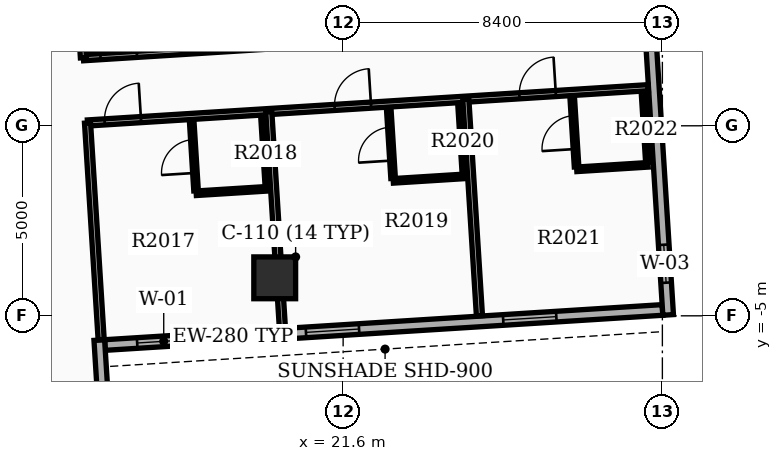
"""IFC4 building model, lengths in metres.
Left out: names, types, materials, properties, quantities, classifications, styles, units other than length and angle.
Written with IfcOpenShell. Run it as: python <this file> out.ifc"""

import sys

from ifc_helpers import new_model, si_unit, direction, frame, frame_2d, origin, origin_2d, place, context, subcontext, project, spatial, rectangle, extrude, element, fill, save


model = new_model("IFC4")
c1 = context("Model", 3, precision=1e-05, world=origin(), true_north=direction((0.0, 1.0)))
c2 = subcontext(c1, "Body", "Model", "MODEL_VIEW")
j1 = project(units=[si_unit("LENGTHUNIT", "METRE"), si_unit("PLANEANGLEUNIT", "RADIAN")], contexts=[c1])
p1 = place(None, origin())
s1 = spatial("IfcSite", under=j1, at=p1, CompositionType="ELEMENT")
p2 = place(p1, origin())
s2 = spatial("IfcBuilding", under=s1, at=p2, CompositionType="ELEMENT")
p3 = place(p2, frame((0.0, 0.0, 128.1)))
s3 = spatial("IfcBuildingStorey", under=s2, at=p3, CompositionType="ELEMENT", Elevation=128.1)
p4 = place(p3, frame((19.8, -4.0, 0.0), z_axis=(0.0, 0.0, 1.0), x_axis=(1.0, 0.0, 0.0)))
e1 = element("IfcColumn", 1, at=p4, inside=s3, PredefinedType="COLUMN", context=c2, shape_type="SweptSolid", body=[
    extrude(rectangle(XDim=1.1, YDim=1.1, at=origin_2d()), origin(), (0.0, 0.0, 1.0), 3.9),
])
p5 = place(p3, frame((15.333, -5.769, 0.0), z_axis=(0.0, 0.0, 1.0), x_axis=(0.998027423805, 0.062779465852, 0.0)))
e2 = element("IfcWall", 2, at=p5, inside=s3, PredefinedType="STANDARD", context=c2, shape_type="SweptSolid", body=[
    extrude(rectangle(XDim=14.7, YDim=0.28, at=frame_2d((7.35, 0.0))), origin(), (0.0, 0.0, 1.0), 2.97),
])
p6 = place(p5, frame((0.85, 0.0, 0.8)))
e3 = element("IfcOpeningElement", 3, at=p6, cuts=e2, PredefinedType="OPENING", context=c2, shape_type="SweptSolid", body=[
    extrude(rectangle(XDim=1.4, YDim=1.6, at=frame_2d((0.7, 0.8))), frame((0.0, 0.15, 0.0), z_axis=(0.0, -1.0, 0.0), x_axis=(1.0, 0.0, 0.0)), (0.0, 0.0, 1.0), 0.3),
])
p7 = place(p5, frame((5.3, 0.0, 0.8)))
e4 = element("IfcOpeningElement", 4, at=p7, cuts=e2, PredefinedType="OPENING", context=c2, shape_type="SweptSolid", body=[
    extrude(rectangle(XDim=1.4, YDim=1.6, at=frame_2d((0.7, 0.8))), frame((0.0, 0.15, 0.0), z_axis=(0.0, -1.0, 0.0), x_axis=(1.0, 0.0, 0.0)), (0.0, 0.0, 1.0), 0.3),
])
p8 = place(p5, frame((10.5, 0.0, 0.8)))
e5 = element("IfcOpeningElement", 5, at=p8, cuts=e2, PredefinedType="OPENING", context=c2, shape_type="SweptSolid", body=[
    extrude(rectangle(XDim=1.4, YDim=1.6, at=frame_2d((0.7, 0.8))), frame((0.0, 0.15, 0.0), z_axis=(0.0, -1.0, 0.0), x_axis=(1.0, 0.0, 0.0)), (0.0, 0.0, 1.0), 0.3),
])
p9 = place(p3, frame((30.152, -4.977, 0.0), z_axis=(0.0, 0.0, 1.0), x_axis=(-0.062797041623, 0.998026318072, 0.0)))
e6 = element("IfcWall", 6, at=p9, inside=s3, PredefinedType="STANDARD", context=c2, shape_type="SweptSolid", body=[
    extrude(rectangle(XDim=13.72, YDim=0.28, at=frame_2d((6.86, 0.0))), origin(), (0.0, 0.0, 1.0), 2.97),
])
p10 = place(p9, frame((0.85, 0.0, 0.85)))
e7 = element("IfcOpeningElement", 7, at=p10, cuts=e6, PredefinedType="OPENING", context=c2, shape_type="SweptSolid", body=[
    extrude(rectangle(XDim=1.0, YDim=1.5, at=frame_2d((0.5, 0.75))), frame((0.0, 0.15, 0.0), z_axis=(0.0, -1.0, 0.0), x_axis=(1.0, 0.0, 0.0)), (0.0, 0.0, 1.0), 0.3),
])
p11 = place(p3, frame((15.184, -5.638, 0.0), z_axis=(0.0, 0.0, 1.0), x_axis=(0.062779317195, -0.998027433156, 0.0)))
e8 = element("IfcWall", 8, at=p11, inside=s3, PredefinedType="STANDARD", context=c2, shape_type="SweptSolid", body=[
    extrude(rectangle(XDim=6.86, YDim=0.28, at=frame_2d((3.43, 0.0))), origin(), (0.0, 0.0, 1.0), 2.97),
])
p12 = place(p3, frame((14.767, 1.791, 0.0), z_axis=(0.0, 0.0, 1.0), x_axis=(0.998026529199, 0.062793686106, 0.0)))
e9 = element("IfcWall", 9, at=p12, inside=s3, PredefinedType="PARTITIONING", context=c2, shape_type="SweptSolid", body=[
    extrude(rectangle(XDim=14.782, YDim=0.16, at=frame_2d((7.391, 0.0))), origin(), (0.0, 0.0, 1.0), 2.96),
])
p13 = place(p12, frame((0.45, 0.0, 0.0)))
e10 = element("IfcOpeningElement", 10, at=p13, cuts=e9, PredefinedType="OPENING", context=c2, shape_type="SweptSolid", body=[
    extrude(rectangle(XDim=0.96, YDim=2.15, at=frame_2d((0.48, 1.075))), frame((0.0, 0.09, 0.0), z_axis=(0.0, -1.0, 0.0), x_axis=(1.0, 0.0, 0.0)), (0.0, 0.0, 1.0), 0.18),
])
p14 = place(p12, frame((6.514, 0.0, 0.0)))
e11 = element("IfcOpeningElement", 11, at=p14, cuts=e9, PredefinedType="OPENING", context=c2, shape_type="SweptSolid", body=[
    extrude(rectangle(XDim=0.96, YDim=2.15, at=frame_2d((0.48, 1.075))), frame((0.0, 0.09, 0.0), z_axis=(0.0, -1.0, 0.0), x_axis=(1.0, 0.0, 0.0)), (0.0, 0.0, 1.0), 0.18),
])
p15 = place(p12, frame((11.386, 0.0, 0.0)))
e12 = element("IfcOpeningElement", 12, at=p15, cuts=e9, PredefinedType="OPENING", context=c2, shape_type="SweptSolid", body=[
    extrude(rectangle(XDim=0.96, YDim=2.15, at=frame_2d((0.48, 1.075))), frame((0.0, 0.09, 0.0), z_axis=(0.0, -1.0, 0.0), x_axis=(1.0, 0.0, 0.0)), (0.0, 0.0, 1.0), 0.18),
])
p16 = place(p3, frame((14.767, 1.791, 0.0), z_axis=(0.0, 0.0, 1.0), x_axis=(-0.062788072387, 0.998026882386, 0.0)))
e13 = element("IfcWall", 13, at=p16, inside=s3, PredefinedType="PARTITIONING", context=c2, shape_type="SweptSolid", body=[
    extrude(rectangle(XDim=5.712, YDim=0.16, at=frame_2d((2.856, 0.0))), origin(), (0.0, 0.0, 1.0), 2.96),
])
p17 = place(p3, frame((14.875, 0.074, 0.0), z_axis=(0.0, 0.0, 1.0), x_axis=(0.998027499025, 0.062778270041, 0.0)))
e14 = element("IfcWall", 14, at=p17, inside=s3, PredefinedType="PARTITIONING", context=c2, shape_type="SweptSolid", body=[
    extrude(rectangle(XDim=14.782, YDim=0.16, at=frame_2d((7.391, 0.0))), origin(), (0.0, 0.0, 1.0), 2.96),
])
p18 = place(p17, frame((0.45, 0.0, 0.0)))
e15 = element("IfcOpeningElement", 15, at=p18, cuts=e14, PredefinedType="OPENING", context=c2, shape_type="SweptSolid", body=[
    extrude(rectangle(XDim=0.96, YDim=2.15, at=frame_2d((0.48, 1.075))), frame((0.0, 0.09, 0.0), z_axis=(0.0, -1.0, 0.0), x_axis=(1.0, 0.0, 0.0)), (0.0, 0.0, 1.0), 0.18),
])
p19 = place(p17, frame((6.514, 0.0, 0.0)))
e16 = element("IfcOpeningElement", 16, at=p19, cuts=e14, PredefinedType="OPENING", context=c2, shape_type="SweptSolid", body=[
    extrude(rectangle(XDim=0.96, YDim=2.15, at=frame_2d((0.48, 1.075))), frame((0.0, 0.09, 0.0), z_axis=(0.0, -1.0, 0.0), x_axis=(1.0, 0.0, 0.0)), (0.0, 0.0, 1.0), 0.18),
])
p20 = place(p17, frame((11.386, 0.0, 0.0)))
e17 = element("IfcOpeningElement", 17, at=p20, cuts=e14, PredefinedType="OPENING", context=c2, shape_type="SweptSolid", body=[
    extrude(rectangle(XDim=0.96, YDim=2.15, at=frame_2d((0.48, 1.075))), frame((0.0, 0.09, 0.0), z_axis=(0.0, -1.0, 0.0), x_axis=(1.0, 0.0, 0.0)), (0.0, 0.0, 1.0), 0.18),
])
p21 = place(p3, frame((14.875, 0.074, 0.0), z_axis=(0.0, 0.0, 1.0), x_axis=(0.062785394105, -0.998027050879, 0.0)))
e18 = element("IfcWall", 18, at=p21, inside=s3, PredefinedType="PARTITIONING", context=c2, shape_type="SweptSolid", body=[
    extrude(rectangle(XDim=5.712, YDim=0.16, at=frame_2d((2.856, 0.0))), origin(), (0.0, 0.0, 1.0), 2.96),
])
p22 = place(p3, frame((19.643, 0.374, 0.0), z_axis=(0.0, 0.0, 1.0), x_axis=(0.062790750896, -0.998026713872, 0.0)))
e19 = element("IfcWall", 19, at=p22, inside=s3, PredefinedType="PARTITIONING", context=c2, shape_type="SweptSolid", body=[
    extrude(rectangle(XDim=5.712, YDim=0.16, at=frame_2d((2.856, 0.0))), origin(), (0.0, 0.0, 1.0), 2.96),
])
p23 = place(p3, frame((17.73, -1.71, 0.0), z_axis=(0.0, 0.0, 1.0), x_axis=(-0.062779145668, 0.998027443946, 0.0)))
e20 = element("IfcWall", 20, at=p23, inside=s3, PredefinedType="PARTITIONING", context=c2, shape_type="SweptSolid", body=[
    extrude(rectangle(XDim=1.82, YDim=0.12, at=frame_2d((0.91, 0.0))), origin(), (0.0, 0.0, 1.0), 2.96),
])
p24 = place(p23, frame((0.47, 0.0, 0.0)))
e21 = element("IfcOpeningElement", 21, at=p24, cuts=e20, PredefinedType="OPENING", context=c2, shape_type="SweptSolid", body=[
    extrude(rectangle(XDim=0.88, YDim=2.1, at=frame_2d((0.44, 1.05))), frame((0.0, 0.07, 0.0), z_axis=(0.0, -1.0, 0.0), x_axis=(1.0, 0.0, 0.0)), (0.0, 0.0, 1.0), 0.14),
])
p25 = place(p3, frame((19.607, -1.592, 0.0), z_axis=(0.0, 0.0, 1.0), x_axis=(-0.062779145668, 0.998027443946, 0.0)))
e22 = element("IfcWall", 22, at=p25, inside=s3, PredefinedType="PARTITIONING", context=c2, shape_type="SweptSolid", body=[
    extrude(rectangle(XDim=1.82, YDim=0.12, at=frame_2d((0.91, 0.0))), origin(), (0.0, 0.0, 1.0), 2.96),
])
p26 = place(p3, frame((17.734, -1.775, 0.0), z_axis=(0.0, 0.0, 1.0), x_axis=(0.998030789148, 0.062725942896, 0.0)))
e23 = element("IfcWall", 23, at=p26, inside=s3, PredefinedType="PARTITIONING", context=c2, shape_type="SweptSolid", body=[
    extrude(rectangle(XDim=1.88, YDim=0.12, at=frame_2d((0.94, 0.0))), origin(), (0.0, 0.0, 1.0), 2.96),
])
p27 = place(p3, frame((24.828, 0.7, 0.0), z_axis=(0.0, 0.0, 1.0), x_axis=(0.062833326074, -0.998024034347, 0.0)))
e24 = element("IfcWall", 24, at=p27, inside=s3, PredefinedType="PARTITIONING", context=c2, shape_type="SweptSolid", body=[
    extrude(rectangle(XDim=5.712, YDim=0.16, at=frame_2d((2.856, 0.0))), origin(), (0.0, 0.0, 1.0), 2.96),
])
p28 = place(p3, frame((22.915, -1.384, 0.0), z_axis=(0.0, 0.0, 1.0), x_axis=(-0.062779145668, 0.998027443946, 0.0)))
e25 = element("IfcWall", 25, at=p28, inside=s3, PredefinedType="PARTITIONING", context=c2, shape_type="SweptSolid", body=[
    extrude(rectangle(XDim=1.82, YDim=0.12, at=frame_2d((0.91, 0.0))), origin(), (0.0, 0.0, 1.0), 2.96),
])
p29 = place(p28, frame((0.47, 0.0, 0.0)))
e26 = element("IfcOpeningElement", 26, at=p29, cuts=e25, PredefinedType="OPENING", context=c2, shape_type="SweptSolid", body=[
    extrude(rectangle(XDim=0.88, YDim=2.1, at=frame_2d((0.44, 1.05))), frame((0.0, 0.07, 0.0), z_axis=(0.0, -1.0, 0.0), x_axis=(1.0, 0.0, 0.0)), (0.0, 0.0, 1.0), 0.14),
])
p30 = place(p3, frame((24.792, -1.266, 0.0), z_axis=(0.0, 0.0, 1.0), x_axis=(-0.062912758763, 0.998019030272, 0.0)))
e27 = element("IfcWall", 27, at=p30, inside=s3, PredefinedType="PARTITIONING", context=c2, shape_type="SweptSolid", body=[
    extrude(rectangle(XDim=1.82, YDim=0.12, at=frame_2d((0.91, 0.0))), origin(), (0.0, 0.0, 1.0), 2.96),
])
p31 = place(p3, frame((22.919, -1.449, 0.0), z_axis=(0.0, 0.0, 1.0), x_axis=(0.998030789148, 0.062725942896, 0.0)))
e28 = element("IfcWall", 28, at=p31, inside=s3, PredefinedType="PARTITIONING", context=c2, shape_type="SweptSolid", body=[
    extrude(rectangle(XDim=1.88, YDim=0.12, at=frame_2d((0.94, 0.0))), origin(), (0.0, 0.0, 1.0), 2.96),
])
p32 = place(p3, frame((27.743, -1.08, 0.0), z_axis=(0.0, 0.0, 1.0), x_axis=(-0.062787551592, 0.998026915151, 0.0)))
e29 = element("IfcWall", 29, at=p32, inside=s3, PredefinedType="PARTITIONING", context=c2, shape_type="SweptSolid", body=[
    extrude(rectangle(XDim=1.82, YDim=0.12, at=frame_2d((0.91, 0.0))), origin(), (0.0, 0.0, 1.0), 2.96),
])
p33 = place(p32, frame((0.47, 0.0, 0.0)))
e30 = element("IfcOpeningElement", 30, at=p33, cuts=e29, PredefinedType="OPENING", context=c2, shape_type="SweptSolid", body=[
    extrude(rectangle(XDim=0.88, YDim=2.1, at=frame_2d((0.44, 1.05))), frame((0.0, 0.07, 0.0), z_axis=(0.0, -1.0, 0.0), x_axis=(1.0, 0.0, 0.0)), (0.0, 0.0, 1.0), 0.14),
])
p34 = place(p3, frame((29.619, -0.962, 0.0), z_axis=(0.0, 0.0, 1.0), x_axis=(-0.062779145668, 0.998027443946, 0.0)))
e31 = element("IfcWall", 31, at=p34, inside=s3, PredefinedType="PARTITIONING", context=c2, shape_type="SweptSolid", body=[
    extrude(rectangle(XDim=1.82, YDim=0.12, at=frame_2d((0.91, 0.0))), origin(), (0.0, 0.0, 1.0), 2.96),
])
p35 = place(p3, frame((27.747, -1.145, 0.0), z_axis=(0.0, 0.0, 1.0), x_axis=(0.998030789148, 0.062725942896, 0.0)))
e32 = element("IfcWall", 32, at=p35, inside=s3, PredefinedType="PARTITIONING", context=c2, shape_type="SweptSolid", body=[
    extrude(rectangle(XDim=1.88, YDim=0.12, at=frame_2d((0.94, 0.0))), origin(), (0.0, 0.0, 1.0), 2.96),
])
p36 = place(p6, origin())
e33 = element("IfcWindow", 33, at=p36, inside=s3, PartitioningType="SINGLE_PANEL", PredefinedType="WINDOW", context=c2, shape_type="SweptSolid", body=[
    extrude(rectangle(XDim=1.4, YDim=1.6, at=frame_2d((0.7, 0.8))), frame((0.0, 0.03, 0.0), z_axis=(0.0, -1.0, 0.0), x_axis=(1.0, 0.0, 0.0)), (0.0, 0.0, 1.0), 0.06),
])
fill(e3, e33)
p37 = place(p7, origin())
e34 = element("IfcWindow", 34, at=p37, inside=s3, PartitioningType="SINGLE_PANEL", PredefinedType="WINDOW", context=c2, shape_type="SweptSolid", body=[
    extrude(rectangle(XDim=1.4, YDim=1.6, at=frame_2d((0.7, 0.8))), frame((0.0, 0.03, 0.0), z_axis=(0.0, -1.0, 0.0), x_axis=(1.0, 0.0, 0.0)), (0.0, 0.0, 1.0), 0.06),
])
fill(e4, e34)
p38 = place(p8, origin())
e35 = element("IfcWindow", 35, at=p38, inside=s3, PartitioningType="SINGLE_PANEL", PredefinedType="WINDOW", context=c2, shape_type="SweptSolid", body=[
    extrude(rectangle(XDim=1.4, YDim=1.6, at=frame_2d((0.7, 0.8))), frame((0.0, 0.03, 0.0), z_axis=(0.0, -1.0, 0.0), x_axis=(1.0, 0.0, 0.0)), (0.0, 0.0, 1.0), 0.06),
])
fill(e5, e35)
p39 = place(p10, origin())
e36 = element("IfcWindow", 36, at=p39, inside=s3, PartitioningType="SINGLE_PANEL", PredefinedType="WINDOW", context=c2, shape_type="SweptSolid", body=[
    extrude(rectangle(XDim=1.0, YDim=1.5, at=frame_2d((0.5, 0.75))), frame((0.0, 0.03, 0.0), z_axis=(0.0, -1.0, 0.0), x_axis=(1.0, 0.0, 0.0)), (0.0, 0.0, 1.0), 0.06),
])
fill(e7, e36)
p40 = place(p13, origin())
e37 = element("IfcDoor", 37, at=p40, inside=s3, OperationType="SINGLE_SWING_RIGHT", PredefinedType="DOOR", context=c2, shape_type="SweptSolid", body=[
    extrude(rectangle(XDim=0.96, YDim=2.15, at=frame_2d((0.48, 1.075))), frame((0.0, 0.025, 0.0), z_axis=(0.0, -1.0, 0.0), x_axis=(1.0, 0.0, 0.0)), (0.0, 0.0, 1.0), 0.05),
])
fill(e10, e37)
p41 = place(p18, origin())
e38 = element("IfcDoor", 38, at=p41, inside=s3, OperationType="SINGLE_SWING_RIGHT", PredefinedType="DOOR", context=c2, shape_type="SweptSolid", body=[
    extrude(rectangle(XDim=0.96, YDim=2.15, at=frame_2d((0.48, 1.075))), frame((0.0, 0.025, 0.0), z_axis=(0.0, -1.0, 0.0), x_axis=(1.0, 0.0, 0.0)), (0.0, 0.0, 1.0), 0.05),
])
fill(e15, e38)
p42 = place(p24, origin())
e39 = element("IfcDoor", 39, at=p42, inside=s3, OperationType="SINGLE_SWING_LEFT", PredefinedType="DOOR", context=c2, shape_type="SweptSolid", body=[
    extrude(rectangle(XDim=0.88, YDim=2.1, at=frame_2d((0.44, 1.05))), frame((0.0, 0.025, 0.0), z_axis=(0.0, -1.0, 0.0), x_axis=(1.0, 0.0, 0.0)), (0.0, 0.0, 1.0), 0.05),
])
fill(e21, e39)
p43 = place(p19, origin())
e40 = element("IfcDoor", 40, at=p43, inside=s3, OperationType="SINGLE_SWING_RIGHT", PredefinedType="DOOR", context=c2, shape_type="SweptSolid", body=[
    extrude(rectangle(XDim=0.96, YDim=2.15, at=frame_2d((0.48, 1.075))), frame((0.0, 0.025, 0.0), z_axis=(0.0, -1.0, 0.0), x_axis=(1.0, 0.0, 0.0)), (0.0, 0.0, 1.0), 0.05),
])
fill(e16, e40)
p44 = place(p29, origin())
e41 = element("IfcDoor", 41, at=p44, inside=s3, OperationType="SINGLE_SWING_LEFT", PredefinedType="DOOR", context=c2, shape_type="SweptSolid", body=[
    extrude(rectangle(XDim=0.88, YDim=2.1, at=frame_2d((0.44, 1.05))), frame((0.0, 0.025, 0.0), z_axis=(0.0, -1.0, 0.0), x_axis=(1.0, 0.0, 0.0)), (0.0, 0.0, 1.0), 0.05),
])
fill(e26, e41)
p45 = place(p20, origin())
e42 = element("IfcDoor", 42, at=p45, inside=s3, OperationType="SINGLE_SWING_RIGHT", PredefinedType="DOOR", context=c2, shape_type="SweptSolid", body=[
    extrude(rectangle(XDim=0.96, YDim=2.15, at=frame_2d((0.48, 1.075))), frame((0.0, 0.025, 0.0), z_axis=(0.0, -1.0, 0.0), x_axis=(1.0, 0.0, 0.0)), (0.0, 0.0, 1.0), 0.05),
])
fill(e17, e42)
p46 = place(p33, origin())
e43 = element("IfcDoor", 43, at=p46, inside=s3, OperationType="SINGLE_SWING_LEFT", PredefinedType="DOOR", context=c2, shape_type="SweptSolid", body=[
    extrude(rectangle(XDim=0.88, YDim=2.1, at=frame_2d((0.44, 1.05))), frame((0.0, 0.025, 0.0), z_axis=(0.0, -1.0, 0.0), x_axis=(1.0, 0.0, 0.0)), (0.0, 0.0, 1.0), 0.05),
])
fill(e30, e43)
save(model, sys.argv[1])
